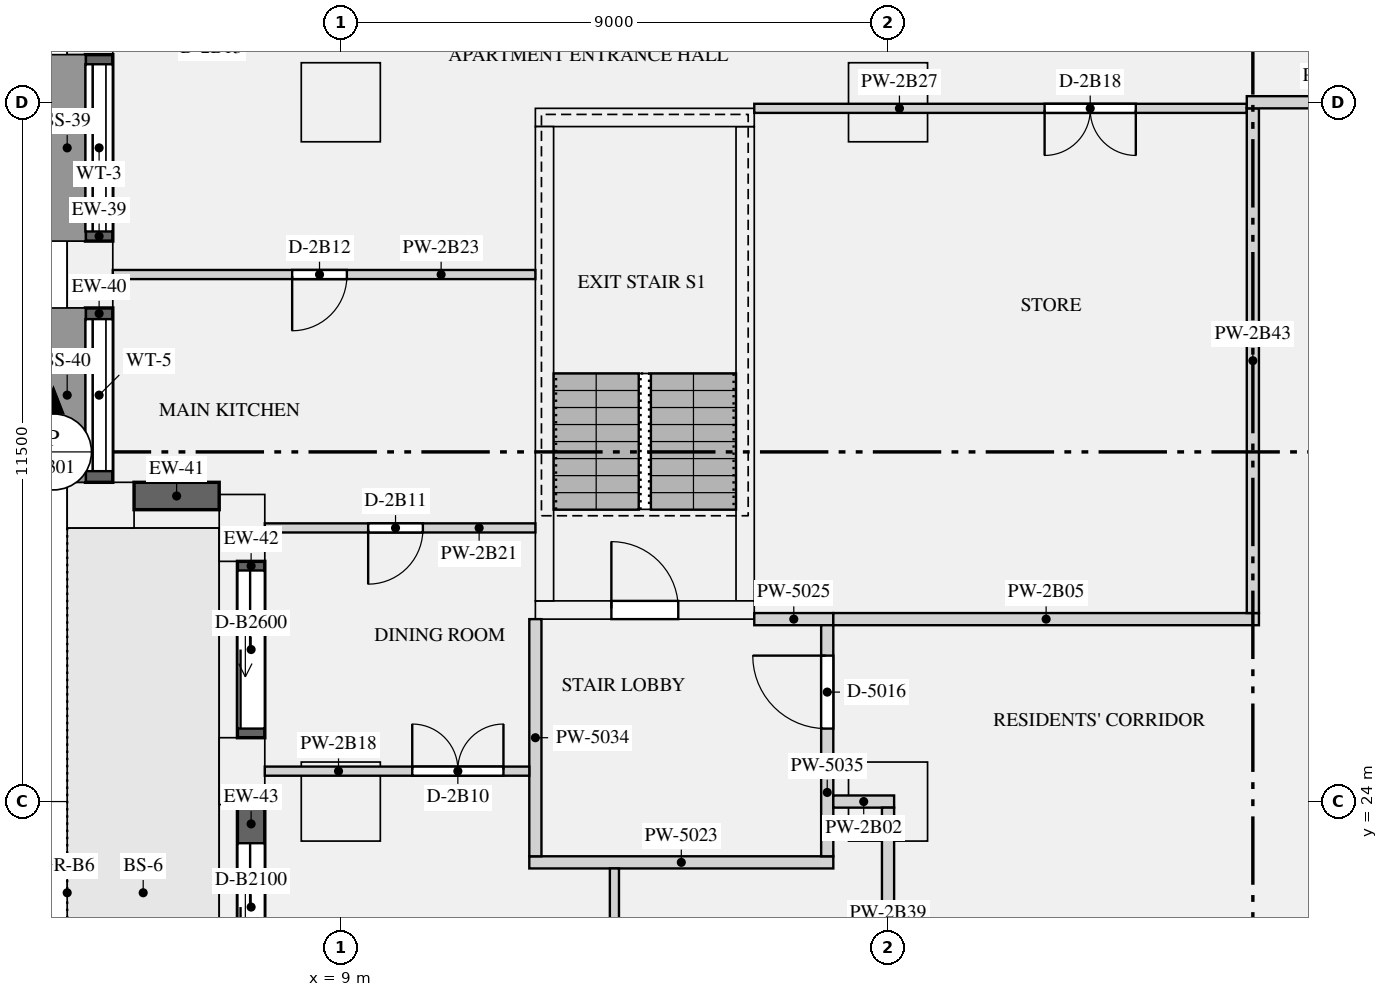
"""IFC4 building model, lengths in metres.
Left out: names, types, materials, properties, quantities, classifications, styles, units other than length and angle.
Written with IfcOpenShell. Run it as: python <this file> out.ifc"""

import sys

from ifc_helpers import new_model, si_unit, direction, frame, frame_2d, origin, origin_2d, place, context, subcontext, project, spatial, rectangle, extrude, element, fill, save


model = new_model("IFC4")
c1 = context("Model", 3, precision=1e-05, world=origin(), true_north=direction((0.0, 1.0)))
c2 = subcontext(c1, "Body", "Model", "MODEL_VIEW")
j1 = project(units=[si_unit("LENGTHUNIT", "METRE"), si_unit("PLANEANGLEUNIT", "RADIAN")], contexts=[c1])
p1 = place(None, origin())
s1 = spatial("IfcSite", under=j1, at=p1, CompositionType="ELEMENT")
p2 = place(p1, origin())
s2 = spatial("IfcBuilding", under=s1, at=p2, CompositionType="ELEMENT")
p3 = place(p2, frame((0.0, 0.0, 93.0)))
s3 = spatial("IfcBuildingStorey", under=s2, at=p3, CompositionType="ELEMENT", Elevation=93.0)
for number, where, z_axis, x_axis in (
    (1, (4.875, 36.833, 0.0), (0.0, 0.0, 1.0), (0.0, -1.0, 0.0)),
    (2, (4.875, 32.667, 0.0), (0.0, 0.0, 1.0), (0.0, -1.0, 0.0)),
    (3, (5.05, 28.875, 0.0), (0.0, 0.0, 1.0), (1.0, 0.0, 0.0)),
    (4, (7.375, 28.5, 0.0), (0.0, 0.0, 1.0), (0.0, -1.0, 0.0)),
    (5, (7.375, 24.5, 0.0), (0.0, 0.0, 1.0), (0.0, -1.0, 0.0)),
):
    element("IfcColumn", number, at=place(p3, frame(where, z_axis=z_axis, x_axis=x_axis)), inside=s3, PredefinedType="USERDEFINED", context=c2, shape_type="SweptSolid", body=[
        extrude(rectangle(XDim=1.1, YDim=0.75, at=origin_2d()), origin(), (0.0, 0.0, 1.0), 3.15),
    ])
for number, where, z_axis, x_axis in (
    (6, (9.0, 24.0, 0.0), (0.0, 0.0, 1.0), (1.0, 0.0, 0.0)),
    (7, (18.0, 24.0, 0.0), (0.0, 0.0, 1.0), (1.0, 0.0, 0.0)),
    (8, (9.0, 35.5, 0.0), (0.0, 0.0, 1.0), (1.0, 0.0, 0.0)),
    (9, (18.0, 35.5, 0.0), (0.0, 0.0, 1.0), (1.0, 0.0, 0.0)),
):
    element("IfcColumn", number, at=place(p3, frame(where, z_axis=z_axis, x_axis=x_axis)), inside=s3, PredefinedType="COLUMN", context=c2, shape_type="SweptSolid", body=[
        extrude(rectangle(XDim=1.3, YDim=1.3, at=origin_2d()), origin(), (0.0, 0.0, 1.0), 3.15),
    ])
p4 = place(p3, frame((12.2, 27.15, 0.0), z_axis=(0.0, 0.0, 1.0), x_axis=(1.0, 0.0, 0.0)))
e10 = element("IfcWall", 10, at=p4, inside=s3, PredefinedType="SHEAR", context=c2, shape_type="SweptSolid", body=[
    extrude(rectangle(XDim=3.6, YDim=0.3, at=frame_2d((1.8, 0.0))), origin(), (0.0, 0.0, 1.0), 3.15),
])
p5 = place(p4, frame((1.25, 0.0, 0.0)))
e11 = element("IfcOpeningElement", 11, at=p5, cuts=e10, PredefinedType="OPENING", context=c2, shape_type="SweptSolid", body=[
    extrude(rectangle(XDim=1.1, YDim=2.1, at=frame_2d((0.55, 1.05))), frame((0.0, 0.16, 0.0), z_axis=(0.0, -1.0, 0.0), x_axis=(1.0, 0.0, 0.0)), (0.0, 0.0, 1.0), 0.32),
])
p6 = place(p3, frame((12.2, 35.25, 0.0), z_axis=(0.0, 0.0, 1.0), x_axis=(1.0, 0.0, 0.0)))
e12 = element("IfcWall", 12, at=p6, inside=s3, PredefinedType="SHEAR", context=c2, shape_type="SweptSolid", body=[
    extrude(rectangle(XDim=3.6, YDim=0.3, at=frame_2d((1.8, 0.0))), origin(), (0.0, 0.0, 1.0), 3.15),
])
for number, where, z_axis, x_axis in (
    (13, (12.35, 27.3, 0.0), (0.0, 0.0, 1.0), (0.0, 1.0, 0.0)),
    (14, (15.65, 27.3, 0.0), (0.0, 0.0, 1.0), (0.0, 1.0, 0.0)),
):
    element("IfcWall", number, at=place(p3, frame(where, z_axis=z_axis, x_axis=x_axis)), inside=s3, PredefinedType="SHEAR", context=c2, shape_type="SweptSolid", body=[
        extrude(rectangle(XDim=7.8, YDim=0.3, at=frame_2d((3.9, 0.0))), origin(), (0.0, 0.0, 1.0), 3.15),
    ])
p7 = place(p3, frame((5.025, 36.283, 0.9), z_axis=(0.0, 0.0, 1.0), x_axis=(0.0, -1.0, 0.0)))
e15 = element("IfcWall", 15, at=p7, inside=s3, PredefinedType="SOLIDWALL", context=c2, shape_type="SweptSolid", body=[
    extrude(rectangle(XDim=3.066, YDim=0.45, at=frame_2d((1.533, 0.0))), origin(), (0.0, 0.0, 1.0), 1.93),
])
p8 = place(p7, frame((0.158, 0.0, 0.15)))
e16 = element("IfcOpeningElement", 16, at=p8, cuts=e15, PredefinedType="OPENING", context=c2, shape_type="SweptSolid", body=[
    extrude(rectangle(XDim=2.75, YDim=1.5, at=frame_2d((1.375, 0.75))), frame((0.0, 0.235, 0.0), z_axis=(0.0, -1.0, 0.0), x_axis=(1.0, 0.0, 0.0)), (0.0, 0.0, 1.0), 0.47),
])
p9 = place(p3, frame((5.025, 32.117, 0.9), z_axis=(0.0, 0.0, 1.0), x_axis=(0.0, -1.0, 0.0)))
e17 = element("IfcWall", 17, at=p9, inside=s3, PredefinedType="SOLIDWALL", context=c2, shape_type="SweptSolid", body=[
    extrude(rectangle(XDim=2.867, YDim=0.45, at=frame_2d((1.434, 0.0))), origin(), (0.0, 0.0, 1.0), 1.93),
])
p10 = place(p9, frame((0.184, 0.0, 0.15)))
e18 = element("IfcOpeningElement", 18, at=p10, cuts=e17, PredefinedType="OPENING", context=c2, shape_type="SweptSolid", body=[
    extrude(rectangle(XDim=2.5, YDim=1.5, at=frame_2d((1.25, 0.75))), frame((0.0, 0.235, 0.0), z_axis=(0.0, -1.0, 0.0), x_axis=(1.0, 0.0, 0.0)), (0.0, 0.0, 1.0), 0.47),
])
p11 = place(p3, frame((5.6, 29.025, 0.9), z_axis=(0.0, 0.0, 1.0), x_axis=(1.0, 0.0, 0.0)))
e19 = element("IfcWall", 19, at=p11, inside=s3, PredefinedType="SOLIDWALL", context=c2, shape_type="SweptSolid", body=[
    extrude(rectangle(XDim=1.4, YDim=0.45, at=frame_2d((0.7, 0.0))), origin(), (0.0, 0.0, 1.0), 1.93),
])
p12 = place(p3, frame((7.525, 27.95, 0.0), z_axis=(0.0, 0.0, 1.0), x_axis=(0.0, -1.0, 0.0)))
e20 = element("IfcWall", 20, at=p12, inside=s3, PredefinedType="SOLIDWALL", context=c2, shape_type="SweptSolid", body=[
    extrude(rectangle(XDim=2.9, YDim=0.45, at=frame_2d((1.45, 0.0))), origin(), (0.0, 0.0, 1.0), 2.83),
])
p13 = place(p12, frame((0.15, 0.0, 0.0)))
e21 = element("IfcOpeningElement", 21, at=p13, cuts=e20, PredefinedType="OPENING", context=c2, shape_type="SweptSolid", body=[
    extrude(rectangle(XDim=2.6, YDim=2.3, at=frame_2d((1.3, 1.15))), frame((0.0, 0.235, 0.0), z_axis=(0.0, -1.0, 0.0), x_axis=(1.0, 0.0, 0.0)), (0.0, 0.0, 1.0), 0.47),
])
p14 = place(p3, frame((7.525, 23.95, 0.0), z_axis=(0.0, 0.0, 1.0), x_axis=(0.0, -1.0, 0.0)))
e22 = element("IfcWall", 22, at=p14, inside=s3, PredefinedType="SOLIDWALL", context=c2, shape_type="SweptSolid", body=[
    extrude(rectangle(XDim=2.9, YDim=0.45, at=frame_2d((1.45, 0.0))), origin(), (0.0, 0.0, 1.0), 2.83),
])
p15 = place(p14, frame((0.635, 0.0, 0.0)))
e23 = element("IfcOpeningElement", 23, at=p15, cuts=e22, PredefinedType="OPENING", context=c2, shape_type="SweptSolid", body=[
    extrude(rectangle(XDim=2.1, YDim=2.3, at=frame_2d((1.05, 1.15))), frame((0.0, 0.235, 0.0), z_axis=(0.0, -1.0, 0.0), x_axis=(1.0, 0.0, 0.0)), (0.0, 0.0, 1.0), 0.47),
])
p16 = place(p3, frame((12.1, 23.0, 0.0), z_axis=(0.0, 0.0, 1.0), x_axis=(1.0, 0.0, 0.0)))
e24 = element("IfcWall", 24, at=p16, inside=s3, PredefinedType="PARTITIONING", context=c2, shape_type="SweptSolid", body=[
    extrude(rectangle(XDim=5.0, YDim=0.2, at=frame_2d((2.5, 0.0))), origin(), (0.0, 0.0, 1.0), 2.83),
])
p17 = place(p3, frame((15.8, 27.0, 0.0), z_axis=(0.0, 0.0, 1.0), x_axis=(1.0, 0.0, 0.0)))
e25 = element("IfcWall", 25, at=p17, inside=s3, PredefinedType="PARTITIONING", context=c2, shape_type="SweptSolid", body=[
    extrude(rectangle(XDim=1.3, YDim=0.2, at=frame_2d((0.65, 0.0))), origin(), (0.0, 0.0, 1.0), 2.83),
])
p18 = place(p3, frame((12.2, 23.1, 0.0), z_axis=(0.0, 0.0, 1.0), x_axis=(0.0, 1.0, 0.0)))
e26 = element("IfcWall", 26, at=p18, inside=s3, PredefinedType="PARTITIONING", context=c2, shape_type="SweptSolid", body=[
    extrude(rectangle(XDim=3.9, YDim=0.2, at=frame_2d((1.95, 0.0))), origin(), (0.0, 0.0, 1.0), 2.83),
])
p19 = place(p3, frame((17.0, 23.1, 0.0), z_axis=(0.0, 0.0, 1.0), x_axis=(0.0, 1.0, 0.0)))
e27 = element("IfcWall", 27, at=p19, inside=s3, PredefinedType="PARTITIONING", context=c2, shape_type="SweptSolid", body=[
    extrude(rectangle(XDim=3.8, YDim=0.2, at=frame_2d((1.9, 0.0))), origin(), (0.0, 0.0, 1.0), 2.83),
])
p20 = place(p19, frame((2.1, 0.0, 0.0)))
e28 = element("IfcOpeningElement", 28, at=p20, cuts=e27, PredefinedType="OPENING", context=c2, shape_type="SweptSolid", body=[
    extrude(rectangle(XDim=1.2, YDim=2.1, at=frame_2d((0.6, 1.05))), frame((0.0, 0.11, 0.0), z_axis=(0.0, -1.0, 0.0), x_axis=(1.0, 0.0, 0.0)), (0.0, 0.0, 1.0), 0.22),
])
p21 = place(p3, frame((17.1, 24.0, 0.0), z_axis=(0.0, 0.0, 1.0), x_axis=(1.0, 0.0, 0.0)))
e29 = element("IfcWall", 29, at=p21, inside=s3, PredefinedType="PARTITIONING", context=c2, shape_type="SweptSolid", body=[
    extrude(rectangle(XDim=1.0, YDim=0.2, at=frame_2d((0.5, 0.0))), origin(), (0.0, 0.0, 1.0), 2.83),
])
p22 = place(p3, frame((17.1, 27.0, 0.0), z_axis=(0.0, 0.0, 1.0), x_axis=(1.0, 0.0, 0.0)))
e30 = element("IfcWall", 30, at=p22, inside=s3, PredefinedType="PARTITIONING", context=c2, shape_type="SweptSolid", body=[
    extrude(rectangle(XDim=7.0, YDim=0.2, at=frame_2d((3.5, 0.0))), origin(), (0.0, 0.0, 1.0), 2.83),
])
p23 = place(p3, frame((23.9, 35.5, 0.0), z_axis=(0.0, 0.0, 1.0), x_axis=(1.0, 0.0, 0.0)))
e31 = element("IfcWall", 31, at=p23, inside=s3, PredefinedType="PARTITIONING", context=c2, shape_type="SweptSolid", body=[
    extrude(rectangle(XDim=3.1, YDim=0.2, at=frame_2d((1.55, 0.0))), origin(), (0.0, 0.0, 1.0), 2.83),
])
p24 = place(p3, frame((7.75, 24.5, 0.0), z_axis=(0.0, 0.0, 1.0), x_axis=(1.0, 0.0, 0.0)))
e32 = element("IfcWall", 32, at=p24, inside=s3, PredefinedType="PARTITIONING", context=c2, shape_type="SweptSolid", body=[
    extrude(rectangle(XDim=4.35, YDim=0.15, at=frame_2d((2.175, 0.0))), origin(), (0.0, 0.0, 1.0), 2.83),
])
p25 = place(p24, frame((2.425, 0.0, 0.0)))
e33 = element("IfcOpeningElement", 33, at=p25, cuts=e32, PredefinedType="OPENING", context=c2, shape_type="SweptSolid", body=[
    extrude(rectangle(XDim=1.5, YDim=2.1, at=frame_2d((0.75, 1.05))), frame((0.0, 0.085, 0.0), z_axis=(0.0, -1.0, 0.0), x_axis=(1.0, 0.0, 0.0)), (0.0, 0.0, 1.0), 0.17),
])
p26 = place(p3, frame((7.75, 28.5, 0.0), z_axis=(0.0, 0.0, 1.0), x_axis=(1.0, 0.0, 0.0)))
e34 = element("IfcWall", 34, at=p26, inside=s3, PredefinedType="PARTITIONING", context=c2, shape_type="SweptSolid", body=[
    extrude(rectangle(XDim=4.45, YDim=0.15, at=frame_2d((2.225, 0.0))), origin(), (0.0, 0.0, 1.0), 2.83),
])
p27 = place(p26, frame((1.7, 0.0, 0.0)))
e35 = element("IfcOpeningElement", 35, at=p27, cuts=e34, PredefinedType="OPENING", context=c2, shape_type="SweptSolid", body=[
    extrude(rectangle(XDim=0.9, YDim=2.1, at=frame_2d((0.45, 1.05))), frame((0.0, 0.085, 0.0), z_axis=(0.0, -1.0, 0.0), x_axis=(1.0, 0.0, 0.0)), (0.0, 0.0, 1.0), 0.17),
])
p28 = place(p3, frame((5.25, 32.667, 0.0), z_axis=(0.0, 0.0, 1.0), x_axis=(1.0, 0.0, 0.0)))
e36 = element("IfcWall", 36, at=p28, inside=s3, PredefinedType="PARTITIONING", context=c2, shape_type="SweptSolid", body=[
    extrude(rectangle(XDim=6.95, YDim=0.15, at=frame_2d((3.475, 0.0))), origin(), (0.0, 0.0, 1.0), 2.83),
])
p29 = place(p28, frame((2.95, 0.0, 0.0)))
e37 = element("IfcOpeningElement", 37, at=p29, cuts=e36, PredefinedType="OPENING", context=c2, shape_type="SweptSolid", body=[
    extrude(rectangle(XDim=0.9, YDim=2.1, at=frame_2d((0.45, 1.05))), frame((0.0, 0.085, 0.0), z_axis=(0.0, -1.0, 0.0), x_axis=(1.0, 0.0, 0.0)), (0.0, 0.0, 1.0), 0.17),
])
p30 = place(p3, frame((15.8, 35.4, 0.0), z_axis=(0.0, 0.0, 1.0), x_axis=(1.0, 0.0, 0.0)))
e38 = element("IfcWall", 38, at=p30, inside=s3, PredefinedType="PARTITIONING", context=c2, shape_type="SweptSolid", body=[
    extrude(rectangle(XDim=8.1, YDim=0.15, at=frame_2d((4.05, 0.0))), origin(), (0.0, 0.0, 1.0), 2.83),
])
p31 = place(p30, frame((4.775, 0.0, 0.0)))
e39 = element("IfcOpeningElement", 39, at=p31, cuts=e38, PredefinedType="OPENING", context=c2, shape_type="SweptSolid", body=[
    extrude(rectangle(XDim=1.5, YDim=2.1, at=frame_2d((0.75, 1.05))), frame((0.0, 0.085, 0.0), z_axis=(0.0, -1.0, 0.0), x_axis=(1.0, 0.0, 0.0)), (0.0, 0.0, 1.0), 0.17),
])
p32 = place(p3, frame((18.0, 16.1, 0.0), z_axis=(0.0, 0.0, 1.0), x_axis=(0.0, 1.0, 0.0)))
e40 = element("IfcWall", 40, at=p32, inside=s3, PredefinedType="PARTITIONING", context=c2, shape_type="SweptSolid", body=[
    extrude(rectangle(XDim=7.8, YDim=0.2, at=frame_2d((3.9, 0.0))), origin(), (0.0, 0.0, 1.0), 2.83),
])
p33 = place(p32, frame((2.35, 0.0, 0.0)))
e41 = element("IfcOpeningElement", 41, at=p33, cuts=e40, PredefinedType="OPENING", context=c2, shape_type="SweptSolid", body=[
    extrude(rectangle(XDim=1.1, YDim=2.1, at=frame_2d((0.55, 1.05))), frame((0.0, 0.11, 0.0), z_axis=(0.0, -1.0, 0.0), x_axis=(1.0, 0.0, 0.0)), (0.0, 0.0, 1.0), 0.22),
])
p34 = place(p3, frame((24.0, 27.1, 0.0), z_axis=(0.0, 0.0, 1.0), x_axis=(0.0, 1.0, 0.0)))
e42 = element("IfcWall", 42, at=p34, inside=s3, PredefinedType="PARTITIONING", context=c2, shape_type="SweptSolid", body=[
    extrude(rectangle(XDim=8.3, YDim=0.2, at=frame_2d((4.15, 0.0))), origin(), (0.0, 0.0, 1.0), 2.83),
])
p35 = place(p3, frame((13.5, 16.575, 0.0), z_axis=(0.0, 0.0, 1.0), x_axis=(0.0, 1.0, 0.0)))
e43 = element("IfcWall", 43, at=p35, inside=s3, PredefinedType="PARTITIONING", context=c2, shape_type="SweptSolid", body=[
    extrude(rectangle(XDim=6.325, YDim=0.15, at=frame_2d((3.163, 0.0))), origin(), (0.0, 0.0, 1.0), 2.83),
])
p36 = place(p35, frame((2.45, 0.0, 0.0)))
e44 = element("IfcOpeningElement", 44, at=p36, cuts=e43, PredefinedType="OPENING", context=c2, shape_type="SweptSolid", body=[
    extrude(rectangle(XDim=1.5, YDim=2.1, at=frame_2d((0.75, 1.05))), frame((0.0, 0.085, 0.0), z_axis=(0.0, -1.0, 0.0), x_axis=(1.0, 0.0, 0.0)), (0.0, 0.0, 1.0), 0.17),
])
p37 = place(p8, origin())
e45 = element("IfcWindow", 45, at=p37, inside=s3, PartitioningType="SINGLE_PANEL", PredefinedType="WINDOW", context=c2, shape_type="SweptSolid", body=[
    extrude(rectangle(XDim=2.75, YDim=1.5, at=frame_2d((1.375, 0.75))), frame((0.0, -0.065, 0.0), z_axis=(0.0, -1.0, 0.0), x_axis=(1.0, 0.0, 0.0)), (0.0, 0.0, 1.0), 0.06),
])
fill(e16, e45)
p38 = place(p10, origin())
e46 = element("IfcWindow", 46, at=p38, inside=s3, PartitioningType="SINGLE_PANEL", PredefinedType="WINDOW", context=c2, shape_type="SweptSolid", body=[
    extrude(rectangle(XDim=2.5, YDim=1.5, at=frame_2d((1.25, 0.75))), frame((0.0, -0.065, 0.0), z_axis=(0.0, -1.0, 0.0), x_axis=(1.0, 0.0, 0.0)), (0.0, 0.0, 1.0), 0.06),
])
fill(e18, e46)
p39 = place(p13, origin())
e47 = element("IfcDoor", 47, at=p39, inside=s3, OperationType="SLIDING_TO_LEFT", PredefinedType="DOOR", context=c2, shape_type="SweptSolid", body=[
    extrude(rectangle(XDim=2.6, YDim=2.3, at=frame_2d((1.3, 1.15))), frame((0.0, -0.07, 0.0), z_axis=(0.0, -1.0, 0.0), x_axis=(1.0, 0.0, 0.0)), (0.0, 0.0, 1.0), 0.05),
])
fill(e21, e47)
p40 = place(p15, origin())
e48 = element("IfcDoor", 48, at=p40, inside=s3, OperationType="SLIDING_TO_LEFT", PredefinedType="DOOR", context=c2, shape_type="SweptSolid", body=[
    extrude(rectangle(XDim=2.1, YDim=2.3, at=frame_2d((1.05, 1.15))), frame((0.0, -0.07, 0.0), z_axis=(0.0, -1.0, 0.0), x_axis=(1.0, 0.0, 0.0)), (0.0, 0.0, 1.0), 0.05),
])
fill(e23, e48)
p41 = place(p5, origin())
e49 = element("IfcDoor", 49, at=p41, inside=s3, OperationType="SINGLE_SWING_LEFT", PredefinedType="DOOR", context=c2, shape_type="SweptSolid", body=[
    extrude(rectangle(XDim=1.1, YDim=2.1, at=frame_2d((0.55, 1.05))), frame((0.0, 0.025, 0.0), z_axis=(0.0, -1.0, 0.0), x_axis=(1.0, 0.0, 0.0)), (0.0, 0.0, 1.0), 0.05),
])
fill(e11, e49)
p42 = place(p20, origin())
e50 = element("IfcDoor", 50, at=p42, inside=s3, OperationType="SINGLE_SWING_RIGHT", PredefinedType="DOOR", context=c2, shape_type="SweptSolid", body=[
    extrude(rectangle(XDim=1.2, YDim=2.1, at=frame_2d((0.6, 1.05))), frame((0.0, 0.025, 0.0), z_axis=(0.0, -1.0, 0.0), x_axis=(1.0, 0.0, 0.0)), (0.0, 0.0, 1.0), 0.05),
])
fill(e28, e50)
p43 = place(p25, origin())
e51 = element("IfcDoor", 51, at=p43, inside=s3, OperationType="DOUBLE_DOOR_SINGLE_SWING", PredefinedType="DOOR", context=c2, shape_type="SweptSolid", body=[
    extrude(rectangle(XDim=1.5, YDim=2.1, at=frame_2d((0.75, 1.05))), frame((0.0, 0.025, 0.0), z_axis=(0.0, -1.0, 0.0), x_axis=(1.0, 0.0, 0.0)), (0.0, 0.0, 1.0), 0.05),
])
fill(e33, e51)
p44 = place(p27, frame((0.9, 0.0, 0.0), z_axis=(0.0, 0.0, 1.0), x_axis=(-1.0, 0.0, 0.0)))
e52 = element("IfcDoor", 52, at=p44, inside=s3, OperationType="SINGLE_SWING_RIGHT", PredefinedType="DOOR", context=c2, shape_type="SweptSolid", body=[
    extrude(rectangle(XDim=0.9, YDim=2.1, at=frame_2d((0.45, 1.05))), frame((0.0, 0.025, 0.0), z_axis=(0.0, -1.0, 0.0), x_axis=(1.0, 0.0, 0.0)), (0.0, 0.0, 1.0), 0.05),
])
fill(e35, e52)
p45 = place(p29, frame((0.9, 0.0, 0.0), z_axis=(0.0, 0.0, 1.0), x_axis=(-1.0, 0.0, 0.0)))
e53 = element("IfcDoor", 53, at=p45, inside=s3, OperationType="SINGLE_SWING_RIGHT", PredefinedType="DOOR", context=c2, shape_type="SweptSolid", body=[
    extrude(rectangle(XDim=0.9, YDim=2.1, at=frame_2d((0.45, 1.05))), frame((0.0, 0.025, 0.0), z_axis=(0.0, -1.0, 0.0), x_axis=(1.0, 0.0, 0.0)), (0.0, 0.0, 1.0), 0.05),
])
fill(e37, e53)
p46 = place(p31, frame((1.5, 0.0, 0.0), z_axis=(0.0, 0.0, 1.0), x_axis=(-1.0, 0.0, 0.0)))
e54 = element("IfcDoor", 54, at=p46, inside=s3, OperationType="DOUBLE_DOOR_SINGLE_SWING", PredefinedType="DOOR", context=c2, shape_type="SweptSolid", body=[
    extrude(rectangle(XDim=1.5, YDim=2.1, at=frame_2d((0.75, 1.05))), frame((0.0, 0.025, 0.0), z_axis=(0.0, -1.0, 0.0), x_axis=(1.0, 0.0, 0.0)), (0.0, 0.0, 1.0), 0.05),
])
fill(e39, e54)
save(model, sys.argv[1])
